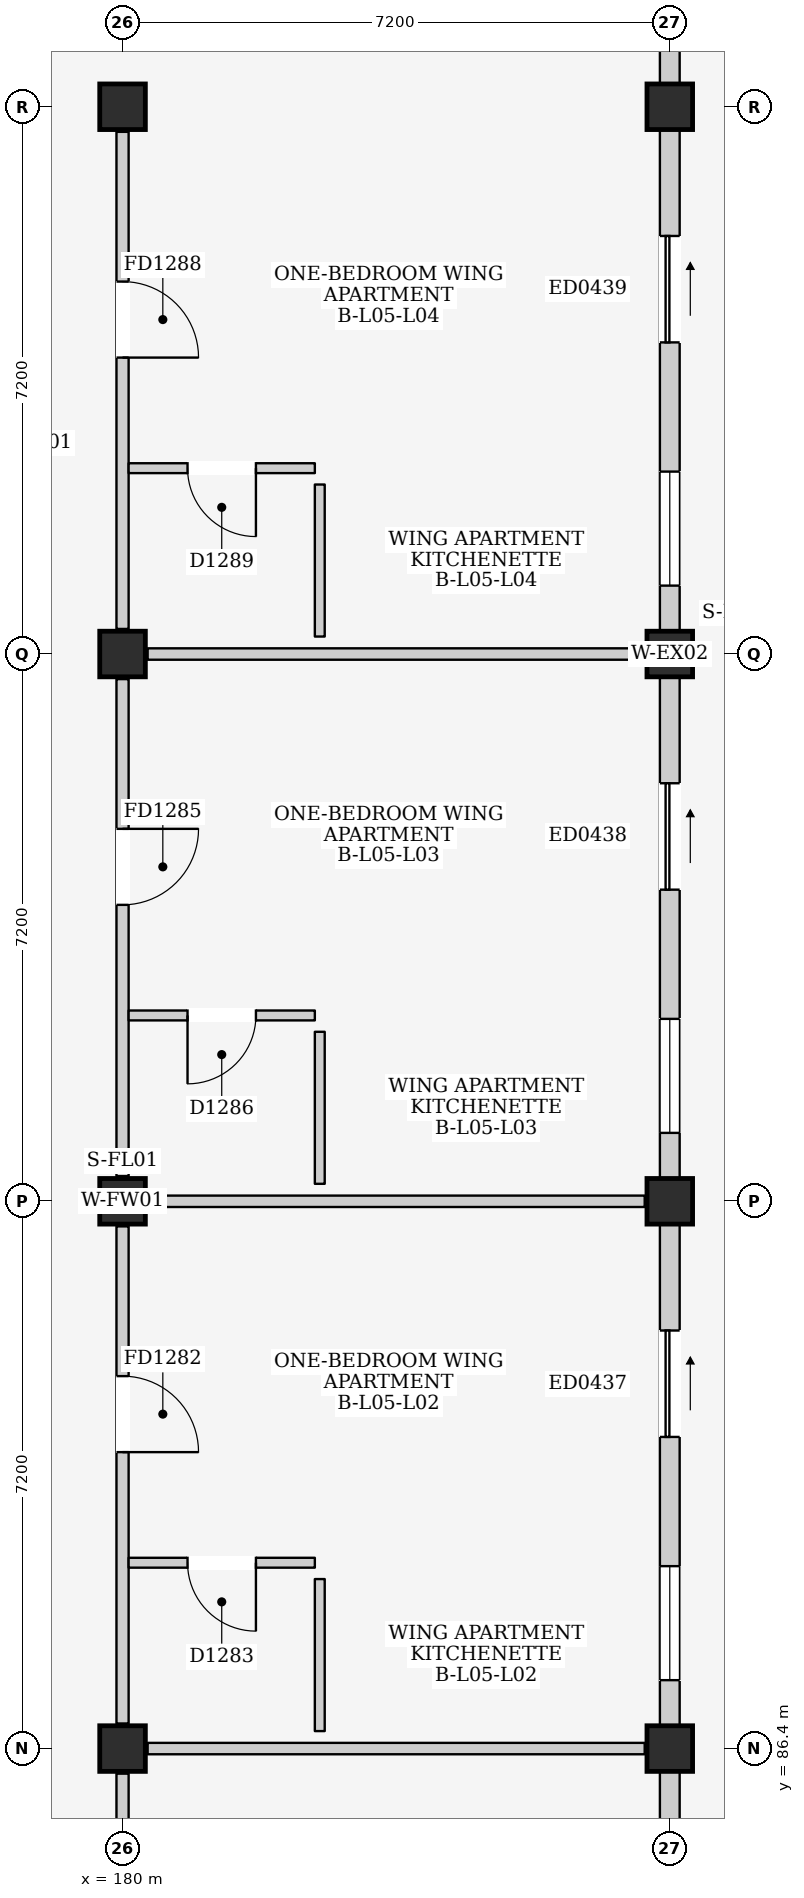
"""IFC4 building model, lengths in metres.
Left out: names, types, materials, properties, quantities, classifications, styles, units other than length and angle.
Written with IfcOpenShell. Run it as: python <this file> out.ifc"""

import sys

from ifc_helpers import new_model, si_unit, direction, frame, frame_2d, origin, origin_2d, place, context, subcontext, project, spatial, rectangle, extrude, element, fill, save


model = new_model("IFC4")
c1 = context("Model", 3, precision=1e-05, world=origin(), true_north=direction((0.0, 1.0)))
c2 = subcontext(c1, "Body", "Model", "MODEL_VIEW")
j1 = project(units=[si_unit("LENGTHUNIT", "METRE"), si_unit("PLANEANGLEUNIT", "RADIAN")], contexts=[c1])
p1 = place(None, origin())
s1 = spatial("IfcSite", under=j1, at=p1, CompositionType="ELEMENT")
p2 = place(p1, origin())
s2 = spatial("IfcBuilding", under=s1, at=p2, CompositionType="ELEMENT")
p3 = place(p2, frame((0.0, 0.0, 18.6)))
s3 = spatial("IfcBuildingStorey", under=s2, at=p3, CompositionType="ELEMENT", Elevation=18.6)
for number, where, z_axis, x_axis in (
    (1, (180.0, 86.4, 0.0), (0.0, 0.0, 1.0), (1.0, 0.0, 0.0)),
    (2, (180.0, 93.6, 0.0), (0.0, 0.0, 1.0), (1.0, 0.0, 0.0)),
    (3, (180.0, 100.8, 0.0), (0.0, 0.0, 1.0), (1.0, 0.0, 0.0)),
    (4, (180.0, 108.0, 0.0), (0.0, 0.0, 1.0), (1.0, 0.0, 0.0)),
    (5, (187.2, 86.4, 0.0), (0.0, 0.0, 1.0), (1.0, 0.0, 0.0)),
    (6, (187.2, 93.6, 0.0), (0.0, 0.0, 1.0), (1.0, 0.0, 0.0)),
    (7, (187.2, 100.8, 0.0), (0.0, 0.0, 1.0), (1.0, 0.0, 0.0)),
    (8, (187.2, 108.0, 0.0), (0.0, 0.0, 1.0), (1.0, 0.0, 0.0)),
):
    element("IfcColumn", number, at=place(p3, frame(where, z_axis=z_axis, x_axis=x_axis)), inside=s3, PredefinedType="COLUMN", context=c2, shape_type="SweptSolid", body=[
        extrude(rectangle(XDim=0.6, YDim=0.6, at=origin_2d()), origin(), (0.0, 0.0, 1.0), 3.3),
    ])
p4 = place(p3, frame((187.2, 79.5, 0.0), z_axis=(0.0, 0.0, 1.0), x_axis=(0.0, 1.0, 0.0)))
e9 = element("IfcWall", 9, at=p4, inside=s3, PredefinedType="ELEMENTEDWALL", context=c2, shape_type="SweptSolid", body=[
    extrude(rectangle(XDim=6.6, YDim=0.26, at=frame_2d((3.3, 0.0))), origin(), (0.0, 0.0, 1.0), 2.595),
])
p5 = place(p4, frame((3.8, 0.0, 0.0)))
e10 = element("IfcOpeningElement", 10, at=p5, cuts=e9, PredefinedType="OPENING", context=c2, shape_type="SweptSolid", body=[
    extrude(rectangle(XDim=1.4, YDim=2.1, at=frame_2d((0.7, 1.05))), frame((0.0, 0.145, 0.0), z_axis=(0.0, -1.0, 0.0), x_axis=(1.0, 0.0, 0.0)), (0.0, 0.0, 1.0), 0.29),
])
p6 = place(p4, frame((0.6, 0.0, 0.95)))
e11 = element("IfcOpeningElement", 11, at=p6, cuts=e9, PredefinedType="OPENING", context=c2, shape_type="SweptSolid", body=[
    extrude(rectangle(XDim=1.5, YDim=1.5, at=frame_2d((0.75, 0.75))), frame((0.0, 0.145, 0.0), z_axis=(0.0, -1.0, 0.0), x_axis=(1.0, 0.0, 0.0)), (0.0, 0.0, 1.0), 0.29),
])
p7 = place(p3, frame((187.2, 86.7, 0.0), z_axis=(0.0, 0.0, 1.0), x_axis=(0.0, 1.0, 0.0)))
e12 = element("IfcWall", 12, at=p7, inside=s3, PredefinedType="ELEMENTEDWALL", context=c2, shape_type="SweptSolid", body=[
    extrude(rectangle(XDim=6.6, YDim=0.26, at=frame_2d((3.3, 0.0))), origin(), (0.0, 0.0, 1.0), 2.595),
])
p8 = place(p7, frame((3.8, 0.0, 0.0)))
e13 = element("IfcOpeningElement", 13, at=p8, cuts=e12, PredefinedType="OPENING", context=c2, shape_type="SweptSolid", body=[
    extrude(rectangle(XDim=1.4, YDim=2.1, at=frame_2d((0.7, 1.05))), frame((0.0, 0.145, 0.0), z_axis=(0.0, -1.0, 0.0), x_axis=(1.0, 0.0, 0.0)), (0.0, 0.0, 1.0), 0.29),
])
p9 = place(p7, frame((0.6, 0.0, 0.95)))
e14 = element("IfcOpeningElement", 14, at=p9, cuts=e12, PredefinedType="OPENING", context=c2, shape_type="SweptSolid", body=[
    extrude(rectangle(XDim=1.5, YDim=1.5, at=frame_2d((0.75, 0.75))), frame((0.0, 0.145, 0.0), z_axis=(0.0, -1.0, 0.0), x_axis=(1.0, 0.0, 0.0)), (0.0, 0.0, 1.0), 0.29),
])
p10 = place(p3, frame((187.2, 93.9, 0.0), z_axis=(0.0, 0.0, 1.0), x_axis=(0.0, 1.0, 0.0)))
e15 = element("IfcWall", 15, at=p10, inside=s3, PredefinedType="ELEMENTEDWALL", context=c2, shape_type="SweptSolid", body=[
    extrude(rectangle(XDim=6.6, YDim=0.26, at=frame_2d((3.3, 0.0))), origin(), (0.0, 0.0, 1.0), 2.595),
])
p11 = place(p10, frame((3.8, 0.0, 0.0)))
e16 = element("IfcOpeningElement", 16, at=p11, cuts=e15, PredefinedType="OPENING", context=c2, shape_type="SweptSolid", body=[
    extrude(rectangle(XDim=1.4, YDim=2.1, at=frame_2d((0.7, 1.05))), frame((0.0, 0.145, 0.0), z_axis=(0.0, -1.0, 0.0), x_axis=(1.0, 0.0, 0.0)), (0.0, 0.0, 1.0), 0.29),
])
p12 = place(p10, frame((0.6, 0.0, 0.95)))
e17 = element("IfcOpeningElement", 17, at=p12, cuts=e15, PredefinedType="OPENING", context=c2, shape_type="SweptSolid", body=[
    extrude(rectangle(XDim=1.5, YDim=1.5, at=frame_2d((0.75, 0.75))), frame((0.0, 0.145, 0.0), z_axis=(0.0, -1.0, 0.0), x_axis=(1.0, 0.0, 0.0)), (0.0, 0.0, 1.0), 0.29),
])
p13 = place(p3, frame((187.2, 101.1, 0.0), z_axis=(0.0, 0.0, 1.0), x_axis=(0.0, 1.0, 0.0)))
e18 = element("IfcWall", 18, at=p13, inside=s3, PredefinedType="ELEMENTEDWALL", context=c2, shape_type="SweptSolid", body=[
    extrude(rectangle(XDim=6.6, YDim=0.26, at=frame_2d((3.3, 0.0))), origin(), (0.0, 0.0, 1.0), 2.595),
])
p14 = place(p13, frame((3.8, 0.0, 0.0)))
e19 = element("IfcOpeningElement", 19, at=p14, cuts=e18, PredefinedType="OPENING", context=c2, shape_type="SweptSolid", body=[
    extrude(rectangle(XDim=1.4, YDim=2.1, at=frame_2d((0.7, 1.05))), frame((0.0, 0.145, 0.0), z_axis=(0.0, -1.0, 0.0), x_axis=(1.0, 0.0, 0.0)), (0.0, 0.0, 1.0), 0.29),
])
p15 = place(p13, frame((0.6, 0.0, 0.95)))
e20 = element("IfcOpeningElement", 20, at=p15, cuts=e18, PredefinedType="OPENING", context=c2, shape_type="SweptSolid", body=[
    extrude(rectangle(XDim=1.5, YDim=1.5, at=frame_2d((0.75, 0.75))), frame((0.0, 0.145, 0.0), z_axis=(0.0, -1.0, 0.0), x_axis=(1.0, 0.0, 0.0)), (0.0, 0.0, 1.0), 0.29),
])
p16 = place(p3, frame((187.2, 108.3, 0.0), z_axis=(0.0, 0.0, 1.0), x_axis=(0.0, 1.0, 0.0)))
e21 = element("IfcWall", 21, at=p16, inside=s3, PredefinedType="ELEMENTEDWALL", context=c2, shape_type="SweptSolid", body=[
    extrude(rectangle(XDim=6.6, YDim=0.26, at=frame_2d((3.3, 0.0))), origin(), (0.0, 0.0, 1.0), 2.595),
])
p17 = place(p16, frame((3.65, 0.0, 0.0)))
e22 = element("IfcOpeningElement", 22, at=p17, cuts=e21, PredefinedType="OPENING", context=c2, shape_type="SweptSolid", body=[
    extrude(rectangle(XDim=1.4, YDim=2.1, at=frame_2d((0.7, 1.05))), frame((0.0, 0.145, 0.0), z_axis=(0.0, -1.0, 0.0), x_axis=(1.0, 0.0, 0.0)), (0.0, 0.0, 1.0), 0.29),
])
p18 = place(p3, frame((180.0, 79.53, 0.0), z_axis=(0.0, 0.0, 1.0), x_axis=(0.0, 1.0, 0.0)))
e23 = element("IfcWall", 23, at=p18, inside=s3, PredefinedType="PARTITIONING", context=c2, shape_type="SweptSolid", body=[
    extrude(rectangle(XDim=6.54, YDim=0.16, at=frame_2d((3.27, 0.0))), origin(), (0.0, 0.0, 1.0), 2.545),
])
p19 = place(p18, frame((3.57, 0.0, 0.0)))
e24 = element("IfcOpeningElement", 24, at=p19, cuts=e23, PredefinedType="OPENING", context=c2, shape_type="SweptSolid", body=[
    extrude(rectangle(XDim=1.0, YDim=2.15, at=frame_2d((0.5, 1.075))), frame((0.0, 0.095, 0.0), z_axis=(0.0, -1.0, 0.0), x_axis=(1.0, 0.0, 0.0)), (0.0, 0.0, 1.0), 0.19),
])
p20 = place(p3, frame((180.33, 86.4, 0.0), z_axis=(0.0, 0.0, 1.0), x_axis=(1.0, 0.0, 0.0)))
e25 = element("IfcWall", 25, at=p20, inside=s3, PredefinedType="PARTITIONING", context=c2, shape_type="SweptSolid", body=[
    extrude(rectangle(XDim=6.54, YDim=0.15, at=frame_2d((3.27, 0.0))), origin(), (0.0, 0.0, 1.0), 2.445),
])
p21 = place(p3, frame((180.0, 86.73, 0.0), z_axis=(0.0, 0.0, 1.0), x_axis=(0.0, 1.0, 0.0)))
e26 = element("IfcWall", 26, at=p21, inside=s3, PredefinedType="PARTITIONING", context=c2, shape_type="SweptSolid", body=[
    extrude(rectangle(XDim=6.54, YDim=0.16, at=frame_2d((3.27, 0.0))), origin(), (0.0, 0.0, 1.0), 2.545),
])
p22 = place(p21, frame((3.57, 0.0, 0.0)))
e27 = element("IfcOpeningElement", 27, at=p22, cuts=e26, PredefinedType="OPENING", context=c2, shape_type="SweptSolid", body=[
    extrude(rectangle(XDim=1.0, YDim=2.15, at=frame_2d((0.5, 1.075))), frame((0.0, 0.095, 0.0), z_axis=(0.0, -1.0, 0.0), x_axis=(1.0, 0.0, 0.0)), (0.0, 0.0, 1.0), 0.19),
])
p23 = place(p3, frame((180.33, 93.6, 0.0), z_axis=(0.0, 0.0, 1.0), x_axis=(1.0, 0.0, 0.0)))
e28 = element("IfcWall", 28, at=p23, inside=s3, PredefinedType="PARTITIONING", context=c2, shape_type="SweptSolid", body=[
    extrude(rectangle(XDim=6.54, YDim=0.15, at=frame_2d((3.27, 0.0))), origin(), (0.0, 0.0, 1.0), 2.445),
])
p24 = place(p3, frame((180.08, 88.845, 0.0), z_axis=(0.0, 0.0, 1.0), x_axis=(1.0, 0.0, 0.0)))
e29 = element("IfcWall", 29, at=p24, inside=s3, PredefinedType="PARTITIONING", context=c2, shape_type="SweptSolid", body=[
    extrude(rectangle(XDim=2.45, YDim=0.13, at=frame_2d((1.225, 0.0))), origin(), (0.0, 0.0, 1.0), 3.06),
])
p25 = place(p24, frame((0.775, 0.0, 0.0)))
e30 = element("IfcOpeningElement", 30, at=p25, cuts=e29, PredefinedType="OPENING", context=c2, shape_type="SweptSolid", body=[
    extrude(rectangle(XDim=0.9, YDim=2.1, at=frame_2d((0.45, 1.05))), frame((0.0, 0.08, 0.0), z_axis=(0.0, -1.0, 0.0), x_axis=(1.0, 0.0, 0.0)), (0.0, 0.0, 1.0), 0.16),
])
p26 = place(p3, frame((182.595, 86.63, 0.0), z_axis=(0.0, 0.0, 1.0), x_axis=(0.0, 1.0, 0.0)))
e31 = element("IfcWall", 31, at=p26, inside=s3, PredefinedType="PARTITIONING", context=c2, shape_type="SweptSolid", body=[
    extrude(rectangle(XDim=2.0, YDim=0.13, at=frame_2d((1.0, 0.0))), origin(), (0.0, 0.0, 1.0), 3.06),
])
p27 = place(p3, frame((180.0, 93.93, 0.0), z_axis=(0.0, 0.0, 1.0), x_axis=(0.0, 1.0, 0.0)))
e32 = element("IfcWall", 32, at=p27, inside=s3, PredefinedType="PARTITIONING", context=c2, shape_type="SweptSolid", body=[
    extrude(rectangle(XDim=6.54, YDim=0.16, at=frame_2d((3.27, 0.0))), origin(), (0.0, 0.0, 1.0), 2.545),
])
p28 = place(p27, frame((3.57, 0.0, 0.0)))
e33 = element("IfcOpeningElement", 33, at=p28, cuts=e32, PredefinedType="OPENING", context=c2, shape_type="SweptSolid", body=[
    extrude(rectangle(XDim=1.0, YDim=2.15, at=frame_2d((0.5, 1.075))), frame((0.0, 0.095, 0.0), z_axis=(0.0, -1.0, 0.0), x_axis=(1.0, 0.0, 0.0)), (0.0, 0.0, 1.0), 0.19),
])
p29 = place(p3, frame((180.33, 100.8, 0.0), z_axis=(0.0, 0.0, 1.0), x_axis=(1.0, 0.0, 0.0)))
e34 = element("IfcWall", 34, at=p29, inside=s3, PredefinedType="PARTITIONING", context=c2, shape_type="SweptSolid", body=[
    extrude(rectangle(XDim=6.54, YDim=0.15, at=frame_2d((3.27, 0.0))), origin(), (0.0, 0.0, 1.0), 2.445),
])
p30 = place(p3, frame((180.08, 96.045, 0.0), z_axis=(0.0, 0.0, 1.0), x_axis=(1.0, 0.0, 0.0)))
e35 = element("IfcWall", 35, at=p30, inside=s3, PredefinedType="PARTITIONING", context=c2, shape_type="SweptSolid", body=[
    extrude(rectangle(XDim=2.45, YDim=0.13, at=frame_2d((1.225, 0.0))), origin(), (0.0, 0.0, 1.0), 3.06),
])
p31 = place(p30, frame((0.775, 0.0, 0.0)))
e36 = element("IfcOpeningElement", 36, at=p31, cuts=e35, PredefinedType="OPENING", context=c2, shape_type="SweptSolid", body=[
    extrude(rectangle(XDim=0.9, YDim=2.1, at=frame_2d((0.45, 1.05))), frame((0.0, 0.08, 0.0), z_axis=(0.0, -1.0, 0.0), x_axis=(1.0, 0.0, 0.0)), (0.0, 0.0, 1.0), 0.16),
])
p32 = place(p3, frame((182.595, 93.83, 0.0), z_axis=(0.0, 0.0, 1.0), x_axis=(0.0, 1.0, 0.0)))
e37 = element("IfcWall", 37, at=p32, inside=s3, PredefinedType="PARTITIONING", context=c2, shape_type="SweptSolid", body=[
    extrude(rectangle(XDim=2.0, YDim=0.13, at=frame_2d((1.0, 0.0))), origin(), (0.0, 0.0, 1.0), 3.06),
])
p33 = place(p3, frame((180.0, 101.13, 0.0), z_axis=(0.0, 0.0, 1.0), x_axis=(0.0, 1.0, 0.0)))
e38 = element("IfcWall", 38, at=p33, inside=s3, PredefinedType="PARTITIONING", context=c2, shape_type="SweptSolid", body=[
    extrude(rectangle(XDim=6.54, YDim=0.16, at=frame_2d((3.27, 0.0))), origin(), (0.0, 0.0, 1.0), 2.545),
])
p34 = place(p33, frame((3.57, 0.0, 0.0)))
e39 = element("IfcOpeningElement", 39, at=p34, cuts=e38, PredefinedType="OPENING", context=c2, shape_type="SweptSolid", body=[
    extrude(rectangle(XDim=1.0, YDim=2.15, at=frame_2d((0.5, 1.075))), frame((0.0, 0.095, 0.0), z_axis=(0.0, -1.0, 0.0), x_axis=(1.0, 0.0, 0.0)), (0.0, 0.0, 1.0), 0.19),
])
p35 = place(p3, frame((180.08, 103.245, 0.0), z_axis=(0.0, 0.0, 1.0), x_axis=(1.0, 0.0, 0.0)))
e40 = element("IfcWall", 40, at=p35, inside=s3, PredefinedType="PARTITIONING", context=c2, shape_type="SweptSolid", body=[
    extrude(rectangle(XDim=2.45, YDim=0.13, at=frame_2d((1.225, 0.0))), origin(), (0.0, 0.0, 1.0), 3.06),
])
p36 = place(p35, frame((0.775, 0.0, 0.0)))
e41 = element("IfcOpeningElement", 41, at=p36, cuts=e40, PredefinedType="OPENING", context=c2, shape_type="SweptSolid", body=[
    extrude(rectangle(XDim=0.9, YDim=2.1, at=frame_2d((0.45, 1.05))), frame((0.0, 0.08, 0.0), z_axis=(0.0, -1.0, 0.0), x_axis=(1.0, 0.0, 0.0)), (0.0, 0.0, 1.0), 0.16),
])
p37 = place(p3, frame((182.595, 101.03, 0.0), z_axis=(0.0, 0.0, 1.0), x_axis=(0.0, 1.0, 0.0)))
e42 = element("IfcWall", 42, at=p37, inside=s3, PredefinedType="PARTITIONING", context=c2, shape_type="SweptSolid", body=[
    extrude(rectangle(XDim=2.0, YDim=0.13, at=frame_2d((1.0, 0.0))), origin(), (0.0, 0.0, 1.0), 3.06),
])
p38 = place(p8, frame((1.4, 0.0, 0.0), z_axis=(0.0, 0.0, 1.0), x_axis=(-1.0, 0.0, 0.0)))
e43 = element("IfcDoor", 43, at=p38, inside=s3, OperationType="SLIDING_TO_RIGHT", PredefinedType="DOOR", context=c2, shape_type="SweptSolid", body=[
    extrude(rectangle(XDim=1.4, YDim=2.1, at=frame_2d((0.7, 1.05))), frame((0.0, 0.025, 0.0), z_axis=(0.0, -1.0, 0.0), x_axis=(1.0, 0.0, 0.0)), (0.0, 0.0, 1.0), 0.05),
])
fill(e13, e43)
p39 = place(p9, origin())
e44 = element("IfcWindow", 44, at=p39, inside=s3, PartitioningType="DOUBLE_PANEL_VERTICAL", PredefinedType="WINDOW", context=c2, shape_type="SweptSolid", body=[
    extrude(rectangle(XDim=1.5, YDim=1.5, at=frame_2d((0.75, 0.75))), frame((0.0, 0.03, 0.0), z_axis=(0.0, -1.0, 0.0), x_axis=(1.0, 0.0, 0.0)), (0.0, 0.0, 1.0), 0.06),
])
fill(e14, e44)
p40 = place(p11, frame((1.4, 0.0, 0.0), z_axis=(0.0, 0.0, 1.0), x_axis=(-1.0, 0.0, 0.0)))
e45 = element("IfcDoor", 45, at=p40, inside=s3, OperationType="SLIDING_TO_RIGHT", PredefinedType="DOOR", context=c2, shape_type="SweptSolid", body=[
    extrude(rectangle(XDim=1.4, YDim=2.1, at=frame_2d((0.7, 1.05))), frame((0.0, 0.025, 0.0), z_axis=(0.0, -1.0, 0.0), x_axis=(1.0, 0.0, 0.0)), (0.0, 0.0, 1.0), 0.05),
])
fill(e16, e45)
p41 = place(p12, origin())
e46 = element("IfcWindow", 46, at=p41, inside=s3, PartitioningType="DOUBLE_PANEL_VERTICAL", PredefinedType="WINDOW", context=c2, shape_type="SweptSolid", body=[
    extrude(rectangle(XDim=1.5, YDim=1.5, at=frame_2d((0.75, 0.75))), frame((0.0, 0.03, 0.0), z_axis=(0.0, -1.0, 0.0), x_axis=(1.0, 0.0, 0.0)), (0.0, 0.0, 1.0), 0.06),
])
fill(e17, e46)
p42 = place(p14, frame((1.4, 0.0, 0.0), z_axis=(0.0, 0.0, 1.0), x_axis=(-1.0, 0.0, 0.0)))
e47 = element("IfcDoor", 47, at=p42, inside=s3, OperationType="SLIDING_TO_RIGHT", PredefinedType="DOOR", context=c2, shape_type="SweptSolid", body=[
    extrude(rectangle(XDim=1.4, YDim=2.1, at=frame_2d((0.7, 1.05))), frame((0.0, 0.025, 0.0), z_axis=(0.0, -1.0, 0.0), x_axis=(1.0, 0.0, 0.0)), (0.0, 0.0, 1.0), 0.05),
])
fill(e19, e47)
p43 = place(p15, origin())
e48 = element("IfcWindow", 48, at=p43, inside=s3, PartitioningType="DOUBLE_PANEL_VERTICAL", PredefinedType="WINDOW", context=c2, shape_type="SweptSolid", body=[
    extrude(rectangle(XDim=1.5, YDim=1.5, at=frame_2d((0.75, 0.75))), frame((0.0, 0.03, 0.0), z_axis=(0.0, -1.0, 0.0), x_axis=(1.0, 0.0, 0.0)), (0.0, 0.0, 1.0), 0.06),
])
fill(e20, e48)
p44 = place(p22, frame((1.0, 0.0, 0.0), z_axis=(0.0, 0.0, 1.0), x_axis=(-1.0, 0.0, 0.0)))
e49 = element("IfcDoor", 49, at=p44, inside=s3, OperationType="SINGLE_SWING_RIGHT", PredefinedType="DOOR", context=c2, shape_type="SweptSolid", body=[
    extrude(rectangle(XDim=1.0, YDim=2.15, at=frame_2d((0.5, 1.075))), frame((0.0, 0.025, 0.0), z_axis=(0.0, -1.0, 0.0), x_axis=(1.0, 0.0, 0.0)), (0.0, 0.0, 1.0), 0.05),
])
fill(e27, e49)
p45 = place(p25, frame((0.9, 0.0, 0.0), z_axis=(0.0, 0.0, 1.0), x_axis=(-1.0, 0.0, 0.0)))
e50 = element("IfcDoor", 50, at=p45, inside=s3, OperationType="SINGLE_SWING_LEFT", PredefinedType="DOOR", context=c2, shape_type="SweptSolid", body=[
    extrude(rectangle(XDim=0.9, YDim=2.1, at=frame_2d((0.45, 1.05))), frame((0.0, 0.025, 0.0), z_axis=(0.0, -1.0, 0.0), x_axis=(1.0, 0.0, 0.0)), (0.0, 0.0, 1.0), 0.05),
])
fill(e30, e50)
p46 = place(p28, frame((1.0, 0.0, 0.0), z_axis=(0.0, 0.0, 1.0), x_axis=(-1.0, 0.0, 0.0)))
e51 = element("IfcDoor", 51, at=p46, inside=s3, OperationType="SINGLE_SWING_LEFT", PredefinedType="DOOR", context=c2, shape_type="SweptSolid", body=[
    extrude(rectangle(XDim=1.0, YDim=2.15, at=frame_2d((0.5, 1.075))), frame((0.0, 0.025, 0.0), z_axis=(0.0, -1.0, 0.0), x_axis=(1.0, 0.0, 0.0)), (0.0, 0.0, 1.0), 0.05),
])
fill(e33, e51)
p47 = place(p31, frame((0.9, 0.0, 0.0), z_axis=(0.0, 0.0, 1.0), x_axis=(-1.0, 0.0, 0.0)))
e52 = element("IfcDoor", 52, at=p47, inside=s3, OperationType="SINGLE_SWING_RIGHT", PredefinedType="DOOR", context=c2, shape_type="SweptSolid", body=[
    extrude(rectangle(XDim=0.9, YDim=2.1, at=frame_2d((0.45, 1.05))), frame((0.0, 0.025, 0.0), z_axis=(0.0, -1.0, 0.0), x_axis=(1.0, 0.0, 0.0)), (0.0, 0.0, 1.0), 0.05),
])
fill(e36, e52)
p48 = place(p34, frame((1.0, 0.0, 0.0), z_axis=(0.0, 0.0, 1.0), x_axis=(-1.0, 0.0, 0.0)))
e53 = element("IfcDoor", 53, at=p48, inside=s3, OperationType="SINGLE_SWING_RIGHT", PredefinedType="DOOR", context=c2, shape_type="SweptSolid", body=[
    extrude(rectangle(XDim=1.0, YDim=2.15, at=frame_2d((0.5, 1.075))), frame((0.0, 0.025, 0.0), z_axis=(0.0, -1.0, 0.0), x_axis=(1.0, 0.0, 0.0)), (0.0, 0.0, 1.0), 0.05),
])
fill(e39, e53)
p49 = place(p36, frame((0.9, 0.0, 0.0), z_axis=(0.0, 0.0, 1.0), x_axis=(-1.0, 0.0, 0.0)))
e54 = element("IfcDoor", 54, at=p49, inside=s3, OperationType="SINGLE_SWING_LEFT", PredefinedType="DOOR", context=c2, shape_type="SweptSolid", body=[
    extrude(rectangle(XDim=0.9, YDim=2.1, at=frame_2d((0.45, 1.05))), frame((0.0, 0.025, 0.0), z_axis=(0.0, -1.0, 0.0), x_axis=(1.0, 0.0, 0.0)), (0.0, 0.0, 1.0), 0.05),
])
fill(e41, e54)
save(model, sys.argv[1])
